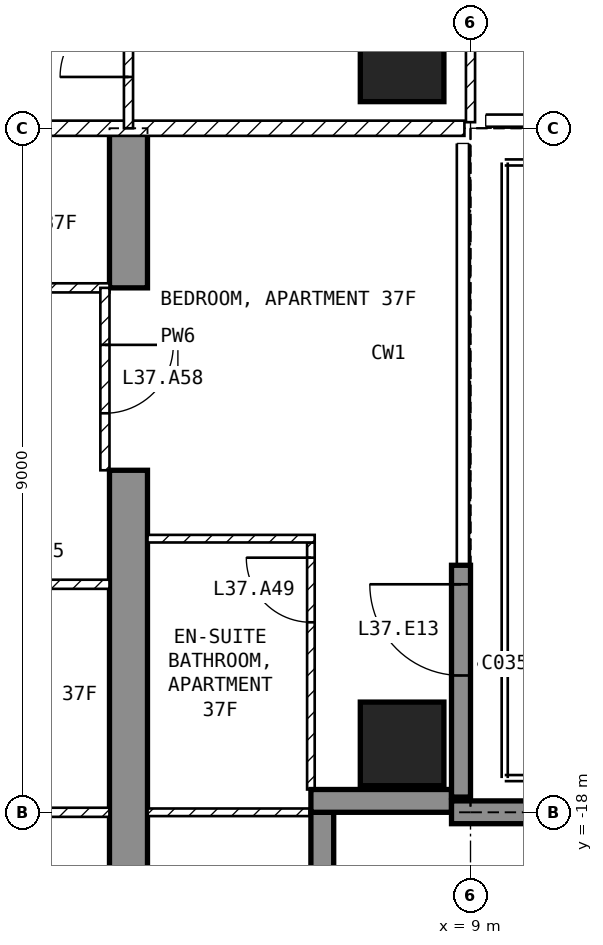
"""IFC4 building model, lengths in metres.
Left out: names, types, materials, properties, quantities, classifications, styles, units other than length and angle.
Written with IfcOpenShell. Run it as: python <this file> out.ifc"""

import sys

from ifc_helpers import new_model, si_unit, direction, frame, frame_2d, origin, origin_2d, place, context, subcontext, project, spatial, polyline, rectangle, outline, extrude, element, fill, save


model = new_model("IFC4")
c1 = context("Model", 3, precision=1e-05, world=origin(), true_north=direction((0.0, 1.0)))
c2 = subcontext(c1, "Body", "Model", "MODEL_VIEW")
j1 = project(units=[si_unit("LENGTHUNIT", "METRE"), si_unit("PLANEANGLEUNIT", "RADIAN")], contexts=[c1])
p1 = place(None, origin())
s1 = spatial("IfcSite", under=j1, at=p1, CompositionType="ELEMENT")
p2 = place(p1, origin())
s2 = spatial("IfcBuilding", under=s1, at=p2, CompositionType="ELEMENT")
p3 = place(p2, frame((0.0, 0.0, 151.4)))
s3 = spatial("IfcBuildingStorey", under=s2, at=p3, CompositionType="ELEMENT", Elevation=151.4)
for number, where, z_axis, x_axis in (
    (1, (8.1, -17.1, -0.25), (0.0, 0.0, 1.0), (1.0, 0.0, 0.0)),
    (2, (8.1, -8.1, -0.25), (0.0, 0.0, 1.0), (1.0, 0.0, 0.0)),
):
    element("IfcColumn", number, at=place(p3, frame(where, z_axis=z_axis, x_axis=x_axis)), inside=s3, PredefinedType="COLUMN", context=c2, shape_type="SweptSolid", body=[
        extrude(rectangle(XDim=1.1, YDim=1.1, at=origin_2d()), origin(), (0.0, 0.0, 1.0), 3.45),
    ])
p4 = place(p3, frame((4.25, -20.15, -0.25), z_axis=(1.0, 0.0, 0.0), x_axis=(0.0, 1.0, 0.0)))
e3 = element("IfcWall", 3, at=p4, inside=s3, PredefinedType="SHEAR", context=c2, shape_type="SweptSolid", body=[
    extrude(outline(polyline([(0.0, 0.0), (6.65, 0.0), (6.65, 2.65), (9.05, 2.65), (9.05, 0.0), (11.15, 0.0), (11.15, 3.45), (0.0, 3.45), (0.0, 0.0)])), origin(), (0.0, 0.0, 1.0), 0.5),
])
p5 = place(p3, frame((8.875, -17.8, 0.0), z_axis=(0.0, 0.0, 1.0), x_axis=(0.0, 1.0, 0.0)))
e4 = element("IfcWall", 4, at=p5, inside=s3, PredefinedType="SOLIDWALL", context=c2, shape_type="SweptSolid", body=[
    extrude(rectangle(XDim=3.05, YDim=0.25, at=frame_2d((1.525, 0.0))), origin(), (0.0, 0.0, 1.0), 3.2),
])
p6 = place(p5, frame((1.6, 0.0, 0.0)))
e5 = element("IfcOpeningElement", 5, at=p6, cuts=e4, PredefinedType="OPENING", context=c2, shape_type="SweptSolid", body=[
    extrude(rectangle(XDim=1.2, YDim=2.4, at=frame_2d((0.6, 1.2))), frame((0.0, 0.135, 0.0), z_axis=(0.0, -1.0, 0.0), x_axis=(1.0, 0.0, 0.0)), (0.0, 0.0, 1.0), 0.27),
])
p7 = place(p3, frame((7.05, -19.8, 0.0), z_axis=(0.0, 0.0, 1.0), x_axis=(0.0, 1.0, 0.0)))
e6 = element("IfcWall", 6, at=p7, inside=s3, PredefinedType="SOLIDWALL", context=c2, shape_type="SweptSolid", body=[
    extrude(rectangle(XDim=1.8, YDim=0.3, at=frame_2d((0.9, 0.0))), origin(), (0.0, 0.0, 1.0), 3.2),
])
p8 = place(p3, frame((6.9, -17.85, 0.0), z_axis=(0.0, 0.0, 1.0), x_axis=(1.0, 0.0, 0.0)))
e7 = element("IfcWall", 7, at=p8, inside=s3, PredefinedType="SOLIDWALL", context=c2, shape_type="SweptSolid", body=[
    extrude(rectangle(XDim=1.85, YDim=0.3, at=frame_2d((0.925, 0.0))), origin(), (0.0, 0.0, 1.0), 3.2),
])
p9 = place(p3, frame((8.75, -18.0, 0.0), z_axis=(0.0, 0.0, 1.0), x_axis=(1.0, 0.0, 0.0)))
e8 = element("IfcWall", 8, at=p9, inside=s3, PredefinedType="SOLIDWALL", context=c2, shape_type="SweptSolid", body=[
    extrude(rectangle(XDim=2.99, YDim=0.3, at=frame_2d((1.495, 0.0))), origin(), (0.0, 0.0, 1.0), 3.2),
])
p10 = place(p3, frame((8.92, -9.0, 0.0), z_axis=(0.0, 0.0, 1.0), x_axis=(-1.0, 0.0, 0.0)))
e9 = element("IfcWall", 9, at=p10, inside=s3, PredefinedType="PARTITIONING", context=c2, shape_type="SweptSolid", body=[
    extrude(rectangle(XDim=17.84, YDim=0.2, at=frame_2d((8.92, 0.0))), origin(), (0.0, 0.0, 1.0), 3.2),
])
p11 = place(p10, frame((8.42, 0.0, 0.0)))
e10 = element("IfcOpeningElement", 10, at=p11, cuts=e9, PredefinedType="OPENING", context=c2, shape_type="SweptSolid", body=[
    extrude(rectangle(XDim=1.0, YDim=2.1, at=frame_2d((0.5, 1.05))), frame((0.0, 0.11, 0.0), z_axis=(0.0, -1.0, 0.0), x_axis=(1.0, 0.0, 0.0)), (0.0, 0.0, 1.0), 0.22),
])
p12 = place(p3, frame((9.0, -8.92, 0.0), z_axis=(0.0, 0.0, 1.0), x_axis=(0.0, 1.0, 0.0)))
e11 = element("IfcWall", 11, at=p12, inside=s3, PredefinedType="PARTITIONING", context=c2, shape_type="SweptSolid", body=[
    extrude(rectangle(XDim=7.62, YDim=0.12, at=frame_2d((3.81, 0.0))), origin(), (0.0, 0.0, 1.0), 3.2),
])
p13 = place(p12, frame((2.52, 0.0, 0.0)))
e12 = element("IfcOpeningElement", 12, at=p13, cuts=e11, PredefinedType="OPENING", context=c2, shape_type="SweptSolid", body=[
    extrude(rectangle(XDim=0.9, YDim=2.1, at=frame_2d((0.45, 1.05))), frame((0.0, 0.07, 0.0), z_axis=(0.0, -1.0, 0.0), x_axis=(1.0, 0.0, 0.0)), (0.0, 0.0, 1.0), 0.14),
])
p14 = place(p3, frame((4.5, -9.0, 0.0), z_axis=(0.0, 0.0, 1.0), x_axis=(0.0, 1.0, 0.0)))
e13 = element("IfcWall", 13, at=p14, inside=s3, PredefinedType="PARTITIONING", context=c2, shape_type="SweptSolid", body=[
    extrude(rectangle(XDim=2.25, YDim=0.12, at=frame_2d((1.125, 0.0))), origin(), (0.0, 0.0, 1.0), 3.2),
])
p15 = place(p14, frame((0.675, 0.0, 0.0)))
e14 = element("IfcOpeningElement", 14, at=p15, cuts=e13, PredefinedType="OPENING", context=c2, shape_type="SweptSolid", body=[
    extrude(rectangle(XDim=0.9, YDim=2.1, at=frame_2d((0.45, 1.05))), frame((0.0, 0.07, 0.0), z_axis=(0.0, -1.0, 0.0), x_axis=(1.0, 0.0, 0.0)), (0.0, 0.0, 1.0), 0.14),
])
p16 = place(p3, frame((4.25, -11.1, 0.0), z_axis=(0.0, 0.0, 1.0), x_axis=(-1.0, 0.0, 0.0)))
e15 = element("IfcWall", 15, at=p16, inside=s3, PredefinedType="PARTITIONING", context=c2, shape_type="SweptSolid", body=[
    extrude(rectangle(XDim=6.35, YDim=0.12, at=frame_2d((3.175, 0.0))), origin(), (0.0, 0.0, 1.0), 3.2),
])
p17 = place(p16, frame((2.725, 0.0, 0.0)))
e16 = element("IfcOpeningElement", 16, at=p17, cuts=e15, PredefinedType="OPENING", context=c2, shape_type="SweptSolid", body=[
    extrude(rectangle(XDim=0.9, YDim=2.1, at=frame_2d((0.45, 1.05))), frame((0.0, 0.07, 0.0), z_axis=(0.0, -1.0, 0.0), x_axis=(1.0, 0.0, 0.0)), (0.0, 0.0, 1.0), 0.14),
])
p18 = place(p3, frame((4.25, -15.0, 0.0), z_axis=(0.0, 0.0, 1.0), x_axis=(-1.0, 0.0, 0.0)))
e17 = element("IfcWall", 17, at=p18, inside=s3, PredefinedType="PARTITIONING", context=c2, shape_type="SweptSolid", body=[
    extrude(rectangle(XDim=3.81, YDim=0.12, at=frame_2d((1.905, 0.0))), origin(), (0.0, 0.0, 1.0), 3.2),
])
p19 = place(p18, frame((1.425, 0.0, 0.0)))
e18 = element("IfcOpeningElement", 18, at=p19, cuts=e17, PredefinedType="OPENING", context=c2, shape_type="SweptSolid", body=[
    extrude(rectangle(XDim=0.9, YDim=2.1, at=frame_2d((0.45, 1.05))), frame((0.0, 0.07, 0.0), z_axis=(0.0, -1.0, 0.0), x_axis=(1.0, 0.0, 0.0)), (0.0, 0.0, 1.0), 0.14),
])
p20 = place(p3, frame((4.25, -18.0, 0.0), z_axis=(0.0, 0.0, 1.0), x_axis=(-1.0, 0.0, 0.0)))
e19 = element("IfcWall", 19, at=p20, inside=s3, PredefinedType="PARTITIONING", context=c2, shape_type="SweptSolid", body=[
    extrude(rectangle(XDim=8.5, YDim=0.12, at=frame_2d((4.25, 0.0))), origin(), (0.0, 0.0, 1.0), 3.2),
])
p21 = place(p20, frame((5.675, 0.0, 0.0)))
e20 = element("IfcOpeningElement", 20, at=p21, cuts=e19, PredefinedType="OPENING", context=c2, shape_type="SweptSolid", body=[
    extrude(rectangle(XDim=0.9, YDim=2.1, at=frame_2d((0.45, 1.05))), frame((0.0, 0.07, 0.0), z_axis=(0.0, -1.0, 0.0), x_axis=(1.0, 0.0, 0.0)), (0.0, 0.0, 1.0), 0.14),
])
p22 = place(p3, frame((6.9, -17.7, 0.0), z_axis=(0.0, 0.0, 1.0), x_axis=(0.0, 1.0, 0.0)))
e21 = element("IfcWall", 21, at=p22, inside=s3, PredefinedType="PARTITIONING", context=c2, shape_type="SweptSolid", body=[
    extrude(rectangle(XDim=3.25, YDim=0.1, at=frame_2d((1.625, 0.0))), origin(), (0.0, 0.0, 1.0), 3.2),
])
p23 = place(p22, frame((2.2, 0.0, 0.0)))
e22 = element("IfcOpeningElement", 22, at=p23, cuts=e21, PredefinedType="OPENING", context=c2, shape_type="SweptSolid", body=[
    extrude(rectangle(XDim=0.85, YDim=2.1, at=frame_2d((0.425, 1.05))), frame((0.0, 0.06, 0.0), z_axis=(0.0, -1.0, 0.0), x_axis=(1.0, 0.0, 0.0)), (0.0, 0.0, 1.0), 0.12),
])
p24 = place(p3, frame((6.95, -14.4, 0.0), z_axis=(0.0, 0.0, 1.0), x_axis=(-1.0, 0.0, 0.0)))
e23 = element("IfcWall", 23, at=p24, inside=s3, PredefinedType="PARTITIONING", context=c2, shape_type="SweptSolid", body=[
    extrude(rectangle(XDim=2.2, YDim=0.1, at=frame_2d((1.1, 0.0))), origin(), (0.0, 0.0, 1.0), 3.2),
])
p25 = place(p3, frame((7.12, -18.0, 0.0), z_axis=(0.0, 0.0, 1.0), x_axis=(-1.0, 0.0, 0.0)))
e24 = element("IfcWall", 24, at=p25, inside=s3, PredefinedType="PARTITIONING", context=c2, shape_type="SweptSolid", body=[
    extrude(rectangle(XDim=2.37, YDim=0.1, at=frame_2d((1.185, 0.0))), origin(), (0.0, 0.0, 1.0), 3.2),
])
p26 = place(p3, frame((4.19, -11.1, 0.0), z_axis=(0.0, 0.0, 1.0), x_axis=(0.0, -1.0, 0.0)))
e25 = element("IfcWall", 25, at=p26, inside=s3, PredefinedType="PARTITIONING", context=c2, shape_type="SweptSolid", body=[
    extrude(rectangle(XDim=2.4, YDim=0.12, at=frame_2d((1.2, 0.0))), origin(), (0.0, 0.0, 1.0), 2.4),
])
p27 = place(p26, frame((0.75, 0.0, 0.0)))
e26 = element("IfcOpeningElement", 26, at=p27, cuts=e25, PredefinedType="OPENING", context=c2, shape_type="SweptSolid", body=[
    extrude(rectangle(XDim=0.9, YDim=2.1, at=frame_2d((0.45, 1.05))), frame((0.0, 0.07, 0.0), z_axis=(0.0, -1.0, 0.0), x_axis=(1.0, 0.0, 0.0)), (0.0, 0.0, 1.0), 0.14),
])
p28 = place(p6, origin())
e27 = element("IfcDoor", 27, at=p28, inside=s3, OperationType="SINGLE_SWING_RIGHT", PredefinedType="DOOR", context=c2, shape_type="SweptSolid", body=[
    extrude(rectangle(XDim=1.2, YDim=2.4, at=frame_2d((0.6, 1.2))), frame((0.0, 0.025, 0.0), z_axis=(0.0, -1.0, 0.0), x_axis=(1.0, 0.0, 0.0)), (0.0, 0.0, 1.0), 0.05),
])
fill(e5, e27)
p29 = place(p15, origin())
e28 = element("IfcDoor", 28, at=p29, inside=s3, OperationType="SINGLE_SWING_LEFT", PredefinedType="DOOR", context=c2, shape_type="SweptSolid", body=[
    extrude(rectangle(XDim=0.9, YDim=2.1, at=frame_2d((0.45, 1.05))), frame((0.0, 0.025, 0.0), z_axis=(0.0, -1.0, 0.0), x_axis=(1.0, 0.0, 0.0)), (0.0, 0.0, 1.0), 0.05),
])
fill(e14, e28)
p30 = place(p23, origin())
e29 = element("IfcDoor", 29, at=p30, inside=s3, OperationType="SINGLE_SWING_RIGHT", PredefinedType="DOOR", context=c2, shape_type="SweptSolid", body=[
    extrude(rectangle(XDim=0.85, YDim=2.1, at=frame_2d((0.425, 1.05))), frame((0.0, 0.025, 0.0), z_axis=(0.0, -1.0, 0.0), x_axis=(1.0, 0.0, 0.0)), (0.0, 0.0, 1.0), 0.05),
])
fill(e22, e29)
p31 = place(p27, origin())
e30 = element("IfcDoor", 30, at=p31, inside=s3, OperationType="SINGLE_SWING_LEFT", PredefinedType="DOOR", context=c2, shape_type="SweptSolid", body=[
    extrude(rectangle(XDim=0.9, YDim=2.1, at=frame_2d((0.45, 1.05))), frame((0.0, 0.025, 0.0), z_axis=(0.0, -1.0, 0.0), x_axis=(1.0, 0.0, 0.0)), (0.0, 0.0, 1.0), 0.05),
])
fill(e26, e30)
save(model, sys.argv[1])
